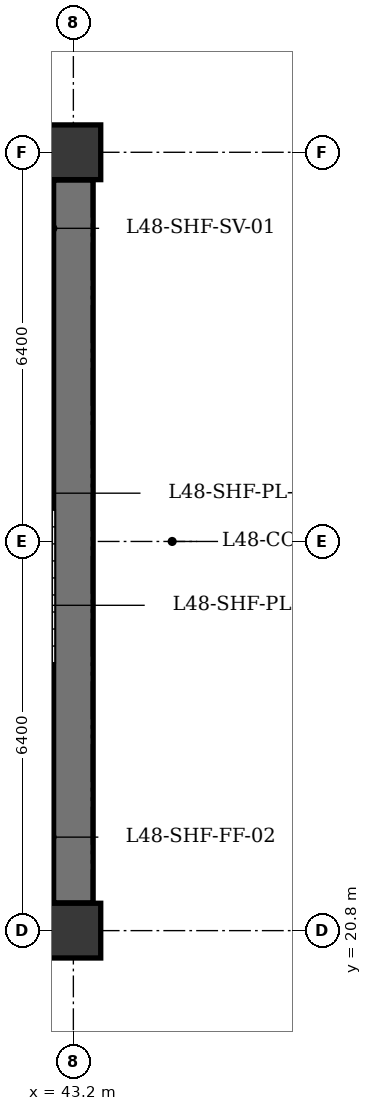
"""IFC4 building model, lengths in metres.
Left out: names, types, materials, properties, quantities, classifications, styles, units other than length and angle.
Written with IfcOpenShell. Run it as: python <this file> out.ifc"""

import sys

from ifc_helpers import new_model, si_unit, direction, frame, frame_2d, origin, origin_2d, place, context, subcontext, project, spatial, rectangle, extrude, element, save


model = new_model("IFC4")
c1 = context("Model", 3, precision=1e-05, world=origin(), true_north=direction((0.0, 1.0)))
c2 = subcontext(c1, "Body", "Model", "MODEL_VIEW")
j1 = project(units=[si_unit("LENGTHUNIT", "METRE"), si_unit("PLANEANGLEUNIT", "RADIAN")], contexts=[c1])
p1 = place(None, origin())
s1 = spatial("IfcSite", under=j1, at=p1, CompositionType="ELEMENT")
p2 = place(p1, origin())
s2 = spatial("IfcBuilding", under=s1, at=p2, CompositionType="ELEMENT")
p3 = place(p2, frame((0.0, 0.0, 186.8)))
s3 = spatial("IfcBuildingStorey", under=s2, at=p3, CompositionType="ELEMENT", Elevation=186.8)
for number, where, z_axis, x_axis in (
    (1, (43.2, 20.8, 0.0), (0.0, 0.0, 1.0), (1.0, 0.0, 0.0)),
    (2, (43.2, 33.6, 0.0), (0.0, 0.0, 1.0), (1.0, 0.0, 0.0)),
):
    element("IfcColumn", number, at=place(p3, frame(where, z_axis=z_axis, x_axis=x_axis)), inside=s3, PredefinedType="COLUMN", context=c2, shape_type="SweptSolid", body=[
        extrude(rectangle(XDim=0.9, YDim=0.9, at=origin_2d()), origin(), (0.0, 0.0, 1.0), 3.5),
    ])
p4 = place(p3, frame((43.2, 21.255, 0.0), z_axis=(0.0, 0.0, 1.0), x_axis=(0.0, 1.0, 0.0)))
e3 = element("IfcWall", 3, at=p4, inside=s3, PredefinedType="SHEAR", context=c2, shape_type="SweptSolid", body=[
    extrude(rectangle(XDim=11.89, YDim=0.65, at=frame_2d((5.945, 0.0))), origin(), (0.0, 0.0, 1.0), 3.2),
])
for number, where, z_axis, x_axis in (
    (4, (39.69, 23.57, 0.0), (0.0, 0.0, 1.0), (1.0, 0.0, 0.0)),
    (5, (39.69, 30.83, 0.0), (0.0, 0.0, 1.0), (1.0, 0.0, 0.0)),
):
    element("IfcWall", number, at=place(p3, frame(where, z_axis=z_axis, x_axis=x_axis)), inside=s3, PredefinedType="SHEAR", context=c2, shape_type="SweptSolid", body=[
        extrude(rectangle(XDim=3.175, YDim=0.25, at=frame_2d((1.587, 0.0))), origin(), (0.0, 0.0, 1.0), 3.2),
    ])
save(model, sys.argv[1])
